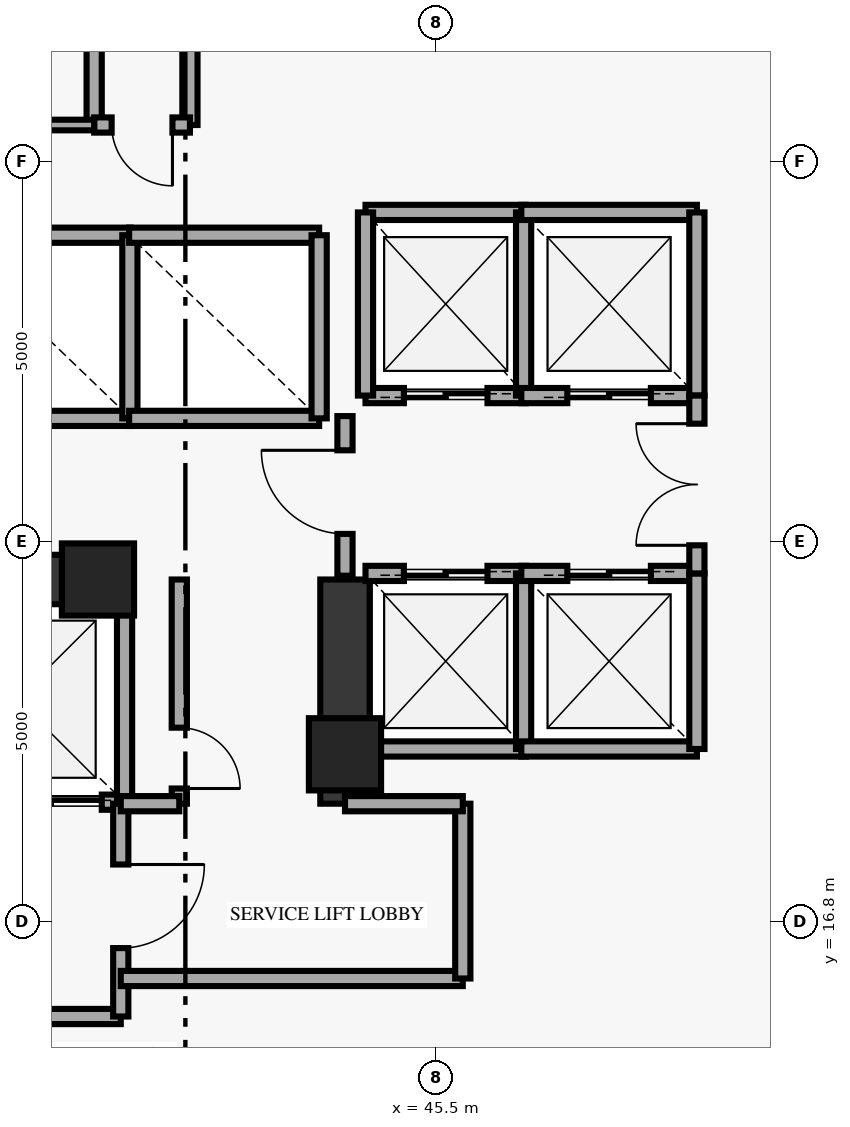
"""IFC4 building model, lengths in metres.
Left out: names, types, materials, properties, quantities, classifications, styles, units other than length and angle.
Written with IfcOpenShell. Run it as: python <this file> out.ifc"""

import sys

from ifc_helpers import new_model, si_unit, direction, frame, frame_2d, origin, origin_2d, place, context, subcontext, project, spatial, rectangle, extrude, element, fill, save


model = new_model("IFC4")
c1 = context("Model", 3, precision=1e-05, world=origin(), true_north=direction((0.0, 1.0)))
c2 = subcontext(c1, "Body", "Model", "MODEL_VIEW")
j1 = project(units=[si_unit("LENGTHUNIT", "METRE"), si_unit("PLANEANGLEUNIT", "RADIAN")], contexts=[c1])
p1 = place(None, origin())
s1 = spatial("IfcSite", under=j1, at=p1, CompositionType="ELEMENT")
p2 = place(p1, origin())
s2 = spatial("IfcBuilding", under=s1, at=p2, CompositionType="ELEMENT")
p3 = place(p2, frame((0.0, 0.0, 192.25)))
s3 = spatial("IfcBuildingStorey", under=s2, at=p3, CompositionType="ELEMENT", Elevation=192.25)
for number, where, z_axis, x_axis in (
    (1, (41.05, 21.3, 0.0), (0.0, 0.0, 1.0), (1.0, 0.0, 0.0)),
    (2, (44.3, 19.0, 0.0), (0.0, 0.0, 1.0), (1.0, 0.0, 0.0)),
):
    element("IfcColumn", number, at=place(p3, frame(where, z_axis=z_axis, x_axis=x_axis)), inside=s3, PredefinedType="PILASTER", context=c2, shape_type="SweptSolid", body=[
        extrude(rectangle(XDim=0.95, YDim=0.95, at=origin_2d()), origin(), (0.0, 0.0, 1.0), 3.35),
    ])
p4 = place(p3, frame((44.3, 18.35, 0.0), z_axis=(0.0, 0.0, 1.0), x_axis=(0.0, 1.0, 0.0)))
e3 = element("IfcWall", 3, at=p4, inside=s3, PredefinedType="SHEAR", context=c2, shape_type="SweptSolid", body=[
    extrude(rectangle(XDim=2.95, YDim=0.65, at=frame_2d((1.475, 0.0))), origin(), (0.0, 0.0, 1.0), 3.35),
])
p5 = place(p3, frame((33.7, 21.3, 0.0), z_axis=(0.0, 0.0, 1.0), x_axis=(1.0, 0.0, 0.0)))
e4 = element("IfcWall", 4, at=p5, inside=s3, PredefinedType="SHEAR", context=c2, shape_type="SweptSolid", body=[
    extrude(rectangle(XDim=7.55, YDim=0.65, at=frame_2d((3.775, 0.0))), origin(), (0.0, 0.0, 1.0), 3.35),
])
for number, where, z_axis, x_axis in (
    (5, (41.0, 27.28, 0.0), (0.0, 0.0, 1.0), (0.0, 1.0, 0.0)),
    (6, (42.26, 27.28, 0.0), (0.0, 0.0, 1.0), (0.0, 1.0, 0.0)),
):
    element("IfcWall", number, at=place(p3, frame(where, z_axis=z_axis, x_axis=x_axis)), inside=s3, PredefinedType="SOLIDWALL", context=c2, shape_type="SweptSolid", body=[
        extrude(rectangle(XDim=1.77, YDim=0.2, at=frame_2d((0.885, 0.0))), origin(), (0.0, 0.0, 1.0), 3.35),
    ])
p6 = place(p3, frame((41.0, 27.28, 0.0), z_axis=(0.0, 0.0, 1.0), x_axis=(1.0, 0.0, 0.0)))
e7 = element("IfcWall", 7, at=p6, inside=s3, PredefinedType="SOLIDWALL", context=c2, shape_type="SweptSolid", body=[
    extrude(rectangle(XDim=1.26, YDim=0.2, at=frame_2d((0.63, 0.0))), origin(), (0.0, 0.0, 1.0), 3.35),
])
p7 = place(p6, frame((0.23, 0.0, 0.0)))
e8 = element("IfcOpeningElement", 8, at=p7, cuts=e7, PredefinedType="OPENING", context=c2, shape_type="SweptSolid", body=[
    extrude(rectangle(XDim=0.8, YDim=2.05, at=frame_2d((0.4, 1.025))), frame((0.0, 0.11, 0.0), z_axis=(0.0, -1.0, 0.0), x_axis=(1.0, 0.0, 0.0)), (0.0, 0.0, 1.0), 0.22),
])
p8 = place(p3, frame((44.57, 23.72, 0.0), z_axis=(0.0, 0.0, 1.0), x_axis=(1.0, 0.0, 0.0)))
e9 = element("IfcWall", 9, at=p8, inside=s3, PredefinedType="SOLIDWALL", context=c2, shape_type="SweptSolid", body=[
    extrude(rectangle(XDim=2.11, YDim=0.2, at=frame_2d((1.055, 0.0))), origin(), (0.0, 0.0, 1.0), 3.35),
])
p9 = place(p8, frame((0.505, 0.0, 0.0)))
e10 = element("IfcOpeningElement", 10, at=p9, cuts=e9, PredefinedType="OPENING", context=c2, shape_type="SweptSolid", body=[
    extrude(rectangle(XDim=1.1, YDim=2.15, at=frame_2d((0.55, 1.075))), frame((0.0, 0.11, 0.0), z_axis=(0.0, -1.0, 0.0), x_axis=(1.0, 0.0, 0.0)), (0.0, 0.0, 1.0), 0.22),
])
p10 = place(p3, frame((44.57, 26.13, 0.0), z_axis=(0.0, 0.0, 1.0), x_axis=(1.0, 0.0, 0.0)))
e11 = element("IfcWall", 11, at=p10, inside=s3, PredefinedType="SOLIDWALL", context=c2, shape_type="SweptSolid", body=[
    extrude(rectangle(XDim=2.11, YDim=0.2, at=frame_2d((1.055, 0.0))), origin(), (0.0, 0.0, 1.0), 3.35),
])
for number, where, z_axis, x_axis in (
    (12, (44.57, 23.72, 0.0), (0.0, 0.0, 1.0), (0.0, 1.0, 0.0)),
    (13, (46.65, 23.72, 0.0), (0.0, 0.0, 1.0), (0.0, 1.0, 0.0)),
):
    element("IfcWall", number, at=place(p3, frame(where, z_axis=z_axis, x_axis=x_axis)), inside=s3, PredefinedType="SOLIDWALL", context=c2, shape_type="SweptSolid", body=[
        extrude(rectangle(XDim=2.41, YDim=0.2, at=frame_2d((1.205, 0.0))), origin(), (0.0, 0.0, 1.0), 3.35),
    ])
p11 = place(p3, frame((46.62, 23.72, 0.0), z_axis=(0.0, 0.0, 1.0), x_axis=(1.0, 0.0, 0.0)))
e14 = element("IfcWall", 14, at=p11, inside=s3, PredefinedType="SOLIDWALL", context=c2, shape_type="SweptSolid", body=[
    extrude(rectangle(XDim=2.31, YDim=0.2, at=frame_2d((1.155, 0.0))), origin(), (0.0, 0.0, 1.0), 3.35),
])
p12 = place(p11, frame((0.605, 0.0, 0.0)))
e15 = element("IfcOpeningElement", 15, at=p12, cuts=e14, PredefinedType="OPENING", context=c2, shape_type="SweptSolid", body=[
    extrude(rectangle(XDim=1.1, YDim=2.15, at=frame_2d((0.55, 1.075))), frame((0.0, 0.11, 0.0), z_axis=(0.0, -1.0, 0.0), x_axis=(1.0, 0.0, 0.0)), (0.0, 0.0, 1.0), 0.22),
])
p13 = place(p3, frame((46.62, 26.13, 0.0), z_axis=(0.0, 0.0, 1.0), x_axis=(1.0, 0.0, 0.0)))
e16 = element("IfcWall", 16, at=p13, inside=s3, PredefinedType="SOLIDWALL", context=c2, shape_type="SweptSolid", body=[
    extrude(rectangle(XDim=2.31, YDim=0.2, at=frame_2d((1.155, 0.0))), origin(), (0.0, 0.0, 1.0), 3.35),
])
p14 = place(p3, frame((48.93, 23.72, 0.0), z_axis=(0.0, 0.0, 1.0), x_axis=(0.0, 1.0, 0.0)))
e17 = element("IfcWall", 17, at=p14, inside=s3, PredefinedType="SOLIDWALL", context=c2, shape_type="SweptSolid", body=[
    extrude(rectangle(XDim=2.41, YDim=0.2, at=frame_2d((1.205, 0.0))), origin(), (0.0, 0.0, 1.0), 3.35),
])
p15 = place(p3, frame((44.57, 19.07, 0.0), z_axis=(0.0, 0.0, 1.0), x_axis=(1.0, 0.0, 0.0)))
e18 = element("IfcWall", 18, at=p15, inside=s3, PredefinedType="SOLIDWALL", context=c2, shape_type="SweptSolid", body=[
    extrude(rectangle(XDim=2.11, YDim=0.2, at=frame_2d((1.055, 0.0))), origin(), (0.0, 0.0, 1.0), 3.35),
])
p16 = place(p3, frame((44.57, 21.38, 0.0), z_axis=(0.0, 0.0, 1.0), x_axis=(1.0, 0.0, 0.0)))
e19 = element("IfcWall", 19, at=p16, inside=s3, PredefinedType="SOLIDWALL", context=c2, shape_type="SweptSolid", body=[
    extrude(rectangle(XDim=2.11, YDim=0.2, at=frame_2d((1.055, 0.0))), origin(), (0.0, 0.0, 1.0), 3.35),
])
p17 = place(p16, frame((0.505, 0.0, 0.0)))
e20 = element("IfcOpeningElement", 20, at=p17, cuts=e19, PredefinedType="OPENING", context=c2, shape_type="SweptSolid", body=[
    extrude(rectangle(XDim=1.1, YDim=2.15, at=frame_2d((0.55, 1.075))), frame((0.0, 0.11, 0.0), z_axis=(0.0, -1.0, 0.0), x_axis=(1.0, 0.0, 0.0)), (0.0, 0.0, 1.0), 0.22),
])
for number, where, z_axis, x_axis in (
    (21, (46.65, 19.07, 0.0), (0.0, 0.0, 1.0), (0.0, 1.0, 0.0)),
    (22, (46.62, 19.07, 0.0), (0.0, 0.0, 1.0), (1.0, 0.0, 0.0)),
):
    element("IfcWall", number, at=place(p3, frame(where, z_axis=z_axis, x_axis=x_axis)), inside=s3, PredefinedType="SOLIDWALL", context=c2, shape_type="SweptSolid", body=[
        extrude(rectangle(XDim=2.31, YDim=0.2, at=frame_2d((1.155, 0.0))), origin(), (0.0, 0.0, 1.0), 3.35),
    ])
p18 = place(p3, frame((46.62, 21.38, 0.0), z_axis=(0.0, 0.0, 1.0), x_axis=(1.0, 0.0, 0.0)))
e23 = element("IfcWall", 23, at=p18, inside=s3, PredefinedType="SOLIDWALL", context=c2, shape_type="SweptSolid", body=[
    extrude(rectangle(XDim=2.31, YDim=0.2, at=frame_2d((1.155, 0.0))), origin(), (0.0, 0.0, 1.0), 3.35),
])
p19 = place(p18, frame((0.605, 0.0, 0.0)))
e24 = element("IfcOpeningElement", 24, at=p19, cuts=e23, PredefinedType="OPENING", context=c2, shape_type="SweptSolid", body=[
    extrude(rectangle(XDim=1.1, YDim=2.15, at=frame_2d((0.55, 1.075))), frame((0.0, 0.11, 0.0), z_axis=(0.0, -1.0, 0.0), x_axis=(1.0, 0.0, 0.0)), (0.0, 0.0, 1.0), 0.22),
])
p20 = place(p3, frame((48.93, 19.07, 0.0), z_axis=(0.0, 0.0, 1.0), x_axis=(0.0, 1.0, 0.0)))
e25 = element("IfcWall", 25, at=p20, inside=s3, PredefinedType="SOLIDWALL", context=c2, shape_type="SweptSolid", body=[
    extrude(rectangle(XDim=2.31, YDim=0.2, at=frame_2d((1.155, 0.0))), origin(), (0.0, 0.0, 1.0), 3.35),
])
for number, where, z_axis, x_axis in (
    (26, (38.98, 23.42, 0.0), (0.0, 0.0, 1.0), (1.0, 0.0, 0.0)),
    (27, (38.98, 25.83, 0.0), (0.0, 0.0, 1.0), (1.0, 0.0, 0.0)),
):
    element("IfcWall", number, at=place(p3, frame(where, z_axis=z_axis, x_axis=x_axis)), inside=s3, PredefinedType="SOLIDWALL", context=c2, shape_type="SweptSolid", body=[
        extrude(rectangle(XDim=2.5, YDim=0.2, at=frame_2d((1.25, 0.0))), origin(), (0.0, 0.0, 1.0), 3.35),
    ])
p21 = place(p3, frame((41.47, 23.42, 0.0), z_axis=(0.0, 0.0, 1.0), x_axis=(0.0, 1.0, 0.0)))
e28 = element("IfcWall", 28, at=p21, inside=s3, PredefinedType="SOLIDWALL", context=c2, shape_type="SweptSolid", body=[
    extrude(rectangle(XDim=2.41, YDim=0.2, at=frame_2d((1.205, 0.0))), origin(), (0.0, 0.0, 1.0), 3.35),
])
for number, where, z_axis, x_axis in (
    (29, (41.46, 23.42, 0.0), (0.0, 0.0, 1.0), (1.0, 0.0, 0.0)),
    (30, (41.46, 25.83, 0.0), (0.0, 0.0, 1.0), (1.0, 0.0, 0.0)),
):
    element("IfcWall", number, at=place(p3, frame(where, z_axis=z_axis, x_axis=x_axis)), inside=s3, PredefinedType="SOLIDWALL", context=c2, shape_type="SweptSolid", body=[
        extrude(rectangle(XDim=2.5, YDim=0.2, at=frame_2d((1.25, 0.0))), origin(), (0.0, 0.0, 1.0), 3.35),
    ])
p22 = place(p3, frame((43.96, 23.42, 0.0), z_axis=(0.0, 0.0, 1.0), x_axis=(0.0, 1.0, 0.0)))
e31 = element("IfcWall", 31, at=p22, inside=s3, PredefinedType="SOLIDWALL", context=c2, shape_type="SweptSolid", body=[
    extrude(rectangle(XDim=2.41, YDim=0.2, at=frame_2d((1.205, 0.0))), origin(), (0.0, 0.0, 1.0), 3.35),
])
p23 = place(p3, frame((38.57, 18.37, 0.0), z_axis=(0.0, 0.0, 1.0), x_axis=(1.0, 0.0, 0.0)))
e32 = element("IfcWall", 32, at=p23, inside=s3, PredefinedType="SOLIDWALL", context=c2, shape_type="SweptSolid", body=[
    extrude(rectangle(XDim=2.83, YDim=0.2, at=frame_2d((1.415, 0.0))), origin(), (0.0, 0.0, 1.0), 3.35),
])
p24 = place(p23, frame((1.18, 0.0, 0.0)))
e33 = element("IfcOpeningElement", 33, at=p24, cuts=e32, PredefinedType="OPENING", context=c2, shape_type="SweptSolid", body=[
    extrude(rectangle(XDim=1.35, YDim=2.18, at=frame_2d((0.675, 1.09))), frame((0.0, 0.11, 0.0), z_axis=(0.0, -1.0, 0.0), x_axis=(1.0, 0.0, 0.0)), (0.0, 0.0, 1.0), 0.22),
])
p25 = place(p3, frame((41.4, 18.37, 0.0), z_axis=(0.0, 0.0, 1.0), x_axis=(0.0, 1.0, 0.0)))
e34 = element("IfcWall", 34, at=p25, inside=s3, PredefinedType="SOLIDWALL", context=c2, shape_type="SweptSolid", body=[
    extrude(rectangle(XDim=2.71, YDim=0.2, at=frame_2d((1.355, 0.0))), origin(), (0.0, 0.0, 1.0), 3.35),
])
p26 = place(p3, frame((48.93, 21.38, 0.0), z_axis=(0.0, 0.0, 1.0), x_axis=(0.0, 1.0, 0.0)))
e35 = element("IfcWall", 35, at=p26, inside=s3, PredefinedType="SOLIDWALL", context=c2, shape_type="SweptSolid", body=[
    extrude(rectangle(XDim=2.34, YDim=0.2, at=frame_2d((1.17, 0.0))), origin(), (0.0, 0.0, 1.0), 3.35),
])
p27 = place(p26, frame((0.37, 0.0, 0.0)))
e36 = element("IfcOpeningElement", 36, at=p27, cuts=e35, PredefinedType="OPENING", context=c2, shape_type="SweptSolid", body=[
    extrude(rectangle(XDim=1.6, YDim=2.2, at=frame_2d((0.8, 1.1))), frame((0.0, 0.11, 0.0), z_axis=(0.0, -1.0, 0.0), x_axis=(1.0, 0.0, 0.0)), (0.0, 0.0, 1.0), 0.22),
])
p28 = place(p3, frame((44.3, 21.35, 0.0), z_axis=(0.0, 0.0, 1.0), x_axis=(0.0, 1.0, 0.0)))
e37 = element("IfcWall", 37, at=p28, inside=s3, PredefinedType="SOLIDWALL", context=c2, shape_type="SweptSolid", body=[
    extrude(rectangle(XDim=2.1, YDim=0.2, at=frame_2d((1.05, 0.0))), origin(), (0.0, 0.0, 1.0), 2.735),
])
p29 = place(p28, frame((0.55, 0.0, 0.0)))
e38 = element("IfcOpeningElement", 38, at=p29, cuts=e37, PredefinedType="OPENING", context=c2, shape_type="SweptSolid", body=[
    extrude(rectangle(XDim=1.1, YDim=2.15, at=frame_2d((0.55, 1.075))), frame((0.0, 0.11, 0.0), z_axis=(0.0, -1.0, 0.0), x_axis=(1.0, 0.0, 0.0)), (0.0, 0.0, 1.0), 0.22),
])
p30 = place(p3, frame((33.8, 15.55, 0.0), z_axis=(0.0, 0.0, 1.0), x_axis=(1.0, 0.0, 0.0)))
e39 = element("IfcWall", 39, at=p30, inside=s3, PredefinedType="SOLIDWALL", context=c2, shape_type="SweptSolid", body=[
    extrude(rectangle(XDim=7.55, YDim=0.2, at=frame_2d((3.775, 0.0))), origin(), (0.0, 0.0, 1.0), 3.35),
])
p31 = place(p3, frame((41.35, 15.55, 0.0), z_axis=(0.0, 0.0, 1.0), x_axis=(0.0, 1.0, 0.0)))
e40 = element("IfcWall", 40, at=p31, inside=s3, PredefinedType="SOLIDWALL", context=c2, shape_type="SweptSolid", body=[
    extrude(rectangle(XDim=2.8, YDim=0.2, at=frame_2d((1.4, 0.0))), origin(), (0.0, 0.0, 1.0), 3.35),
])
p32 = place(p31, frame((0.9, 0.0, 0.0)))
e41 = element("IfcOpeningElement", 41, at=p32, cuts=e40, PredefinedType="OPENING", context=c2, shape_type="SweptSolid", body=[
    extrude(rectangle(XDim=1.1, YDim=2.15, at=frame_2d((0.55, 1.075))), frame((0.0, 0.11, 0.0), z_axis=(0.0, -1.0, 0.0), x_axis=(1.0, 0.0, 0.0)), (0.0, 0.0, 1.0), 0.22),
])
p33 = place(p3, frame((41.35, 16.05, 0.0), z_axis=(0.0, 0.0, 1.0), x_axis=(1.0, 0.0, 0.0)))
e42 = element("IfcWall", 42, at=p33, inside=s3, PredefinedType="SOLIDWALL", context=c2, shape_type="SweptSolid", body=[
    extrude(rectangle(XDim=4.5, YDim=0.2, at=frame_2d((2.25, 0.0))), origin(), (0.0, 0.0, 1.0), 3.35),
])
p34 = place(p3, frame((45.85, 16.05, 0.0), z_axis=(0.0, 0.0, 1.0), x_axis=(0.0, 1.0, 0.0)))
e43 = element("IfcWall", 43, at=p34, inside=s3, PredefinedType="SOLIDWALL", context=c2, shape_type="SweptSolid", body=[
    extrude(rectangle(XDim=2.3, YDim=0.2, at=frame_2d((1.15, 0.0))), origin(), (0.0, 0.0, 1.0), 3.35),
])
p35 = place(p3, frame((44.3, 18.35, 0.0), z_axis=(0.0, 0.0, 1.0), x_axis=(1.0, 0.0, 0.0)))
e44 = element("IfcWall", 44, at=p35, inside=s3, PredefinedType="SOLIDWALL", context=c2, shape_type="SweptSolid", body=[
    extrude(rectangle(XDim=1.55, YDim=0.2, at=frame_2d((0.775, 0.0))), origin(), (0.0, 0.0, 1.0), 3.35),
])
p36 = place(p3, frame((42.12, 18.35, 0.0), z_axis=(0.0, 0.0, 1.0), x_axis=(0.0, 1.0, 0.0)))
e45 = element("IfcWall", 45, at=p36, inside=s3, PredefinedType="SOLIDWALL", context=c2, shape_type="SweptSolid", body=[
    extrude(rectangle(XDim=2.95, YDim=0.2, at=frame_2d((1.475, 0.0))), origin(), (0.0, 0.0, 1.0), 3.35),
])
p37 = place(p36, frame((0.2, 0.0, 0.0)))
e46 = element("IfcOpeningElement", 46, at=p37, cuts=e45, PredefinedType="OPENING", context=c2, shape_type="SweptSolid", body=[
    extrude(rectangle(XDim=0.8, YDim=2.05, at=frame_2d((0.4, 1.025))), frame((0.0, 0.11, 0.0), z_axis=(0.0, -1.0, 0.0), x_axis=(1.0, 0.0, 0.0)), (0.0, 0.0, 1.0), 0.22),
])
p38 = place(p3, frame((41.35, 18.35, 0.0), z_axis=(0.0, 0.0, 1.0), x_axis=(1.0, 0.0, 0.0)))
e47 = element("IfcWall", 47, at=p38, inside=s3, PredefinedType="SOLIDWALL", context=c2, shape_type="SweptSolid", body=[
    extrude(rectangle(XDim=0.77, YDim=0.2, at=frame_2d((0.385, 0.0))), origin(), (0.0, 0.0, 1.0), 3.35),
])
p39 = place(p3, frame((35.6, 27.28, 0.0), z_axis=(0.0, 0.0, 1.0), x_axis=(1.0, 0.0, 0.0)))
e48 = element("IfcWall", 48, at=p39, inside=s3, PredefinedType="PARTITIONING", context=c2, shape_type="SweptSolid", body=[
    extrude(rectangle(XDim=5.4, YDim=0.14, at=frame_2d((2.7, 0.0))), origin(), (0.0, 0.0, 1.0), 3.35),
])
p40 = place(p39, frame((2.225, 0.0, 0.0)))
e49 = element("IfcOpeningElement", 49, at=p40, cuts=e48, PredefinedType="OPENING", context=c2, shape_type="SweptSolid", body=[
    extrude(rectangle(XDim=0.95, YDim=2.1, at=frame_2d((0.475, 1.05))), frame((0.0, 0.08, 0.0), z_axis=(0.0, -1.0, 0.0), x_axis=(1.0, 0.0, 0.0)), (0.0, 0.0, 1.0), 0.16),
])
p41 = place(p7, origin())
e50 = element("IfcDoor", 50, at=p41, inside=s3, OperationType="SINGLE_SWING_RIGHT", PredefinedType="DOOR", context=c2, shape_type="SweptSolid", body=[
    extrude(rectangle(XDim=0.8, YDim=2.05, at=frame_2d((0.4, 1.025))), frame((0.0, 0.025, 0.0), z_axis=(0.0, -1.0, 0.0), x_axis=(1.0, 0.0, 0.0)), (0.0, 0.0, 1.0), 0.05),
])
fill(e8, e50)
p42 = place(p9, origin())
e51 = element("IfcDoor", 51, at=p42, inside=s3, OperationType="DOUBLE_DOOR_SLIDING", PredefinedType="DOOR", context=c2, shape_type="SweptSolid", body=[
    extrude(rectangle(XDim=1.1, YDim=2.15, at=frame_2d((0.55, 1.075))), frame((0.0, 0.025, 0.0), z_axis=(0.0, -1.0, 0.0), x_axis=(1.0, 0.0, 0.0)), (0.0, 0.0, 1.0), 0.05),
])
fill(e10, e51)
p43 = place(p12, origin())
e52 = element("IfcDoor", 52, at=p43, inside=s3, OperationType="DOUBLE_DOOR_SLIDING", PredefinedType="DOOR", context=c2, shape_type="SweptSolid", body=[
    extrude(rectangle(XDim=1.1, YDim=2.15, at=frame_2d((0.55, 1.075))), frame((0.0, 0.025, 0.0), z_axis=(0.0, -1.0, 0.0), x_axis=(1.0, 0.0, 0.0)), (0.0, 0.0, 1.0), 0.05),
])
fill(e15, e52)
p44 = place(p17, origin())
e53 = element("IfcDoor", 53, at=p44, inside=s3, OperationType="DOUBLE_DOOR_SLIDING", PredefinedType="DOOR", context=c2, shape_type="SweptSolid", body=[
    extrude(rectangle(XDim=1.1, YDim=2.15, at=frame_2d((0.55, 1.075))), frame((0.0, 0.025, 0.0), z_axis=(0.0, -1.0, 0.0), x_axis=(1.0, 0.0, 0.0)), (0.0, 0.0, 1.0), 0.05),
])
fill(e20, e53)
p45 = place(p19, origin())
e54 = element("IfcDoor", 54, at=p45, inside=s3, OperationType="DOUBLE_DOOR_SLIDING", PredefinedType="DOOR", context=c2, shape_type="SweptSolid", body=[
    extrude(rectangle(XDim=1.1, YDim=2.15, at=frame_2d((0.55, 1.075))), frame((0.0, 0.025, 0.0), z_axis=(0.0, -1.0, 0.0), x_axis=(1.0, 0.0, 0.0)), (0.0, 0.0, 1.0), 0.05),
])
fill(e24, e54)
p46 = place(p24, origin())
e55 = element("IfcDoor", 55, at=p46, inside=s3, OperationType="DOUBLE_DOOR_SLIDING", PredefinedType="DOOR", context=c2, shape_type="SweptSolid", body=[
    extrude(rectangle(XDim=1.35, YDim=2.18, at=frame_2d((0.675, 1.09))), frame((0.0, 0.025, 0.0), z_axis=(0.0, -1.0, 0.0), x_axis=(1.0, 0.0, 0.0)), (0.0, 0.0, 1.0), 0.05),
])
fill(e33, e55)
p47 = place(p27, origin())
e56 = element("IfcDoor", 56, at=p47, inside=s3, OperationType="DOUBLE_DOOR_SINGLE_SWING", PredefinedType="DOOR", context=c2, shape_type="SweptSolid", body=[
    extrude(rectangle(XDim=1.6, YDim=2.2, at=frame_2d((0.8, 1.1))), frame((0.0, 0.025, 0.0), z_axis=(0.0, -1.0, 0.0), x_axis=(1.0, 0.0, 0.0)), (0.0, 0.0, 1.0), 0.05),
])
fill(e36, e56)
p48 = place(p29, origin())
e57 = element("IfcDoor", 57, at=p48, inside=s3, OperationType="SINGLE_SWING_RIGHT", PredefinedType="DOOR", context=c2, shape_type="SweptSolid", body=[
    extrude(rectangle(XDim=1.1, YDim=2.15, at=frame_2d((0.55, 1.075))), frame((0.0, 0.025, 0.0), z_axis=(0.0, -1.0, 0.0), x_axis=(1.0, 0.0, 0.0)), (0.0, 0.0, 1.0), 0.05),
])
fill(e38, e57)
p49 = place(p32, origin())
e58 = element("IfcDoor", 58, at=p49, inside=s3, OperationType="SINGLE_SWING_RIGHT", PredefinedType="DOOR", context=c2, shape_type="SweptSolid", body=[
    extrude(rectangle(XDim=1.1, YDim=2.15, at=frame_2d((0.55, 1.075))), frame((0.0, 0.025, 0.0), z_axis=(0.0, -1.0, 0.0), x_axis=(1.0, 0.0, 0.0)), (0.0, 0.0, 1.0), 0.05),
])
fill(e41, e58)
p50 = place(p37, origin())
e59 = element("IfcDoor", 59, at=p50, inside=s3, OperationType="SINGLE_SWING_LEFT", PredefinedType="DOOR", context=c2, shape_type="SweptSolid", body=[
    extrude(rectangle(XDim=0.8, YDim=2.05, at=frame_2d((0.4, 1.025))), frame((0.0, 0.025, 0.0), z_axis=(0.0, -1.0, 0.0), x_axis=(1.0, 0.0, 0.0)), (0.0, 0.0, 1.0), 0.05),
])
fill(e46, e59)
save(model, sys.argv[1])
